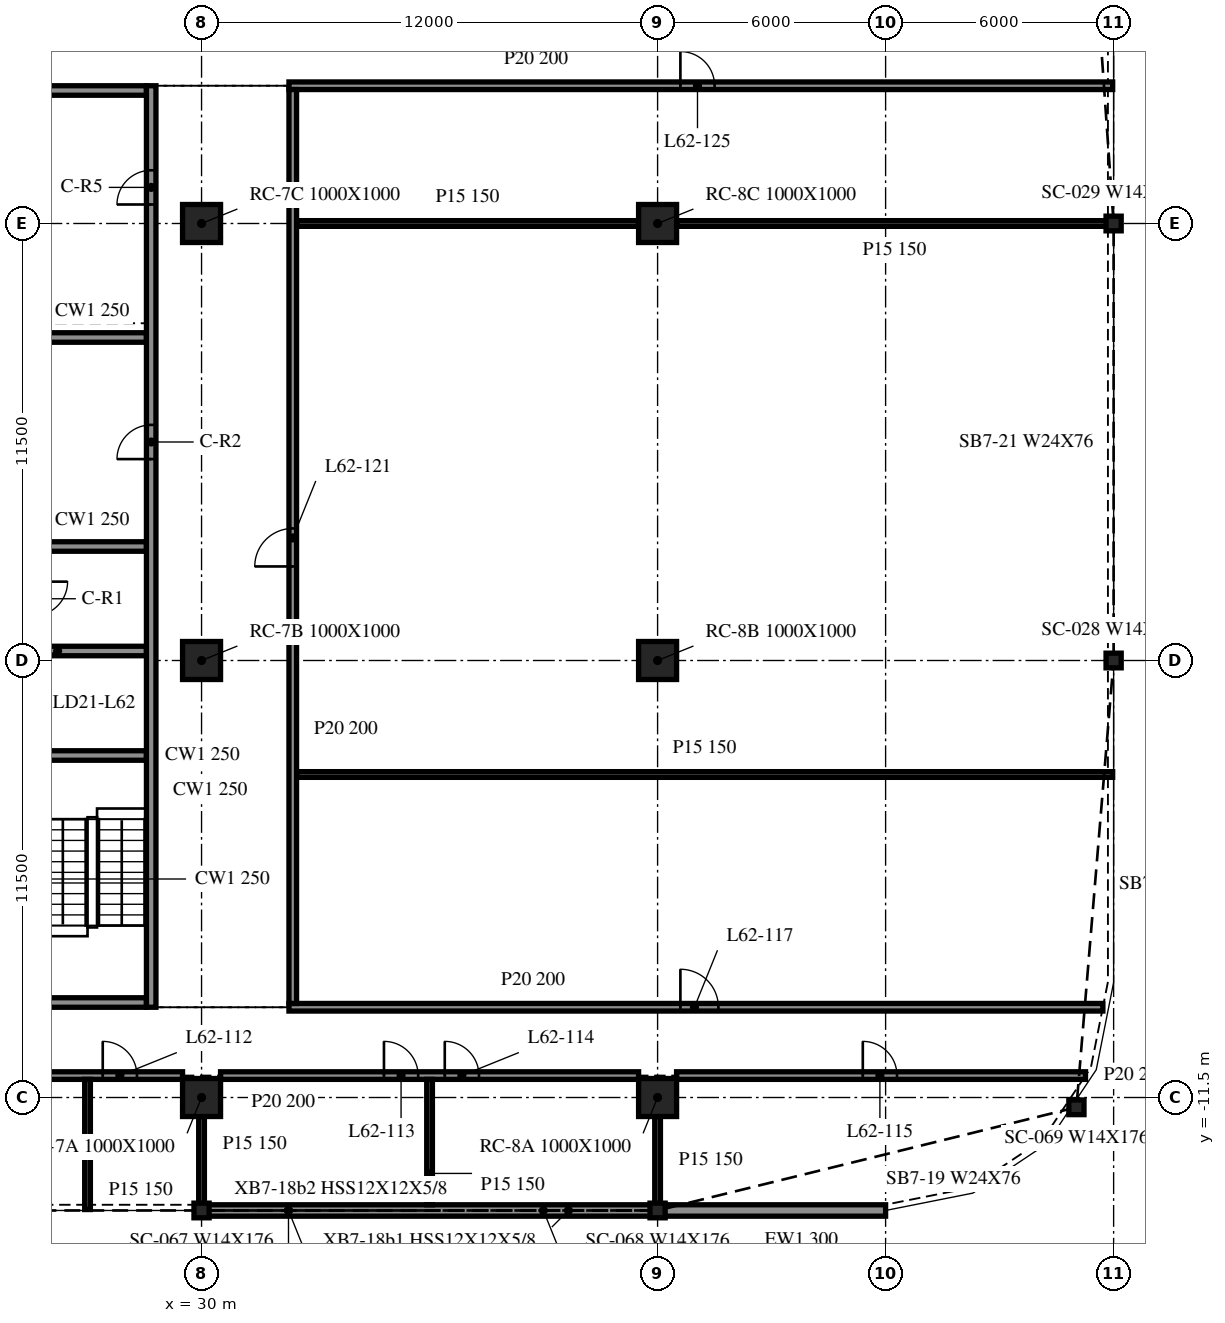
"""IFC4 building model, lengths in metres.
Left out: names, types, materials, properties, quantities, classifications, styles, units other than length and angle.
Written with IfcOpenShell. Run it as: python <this file> out.ifc"""

import sys

from ifc_helpers import new_model, si_unit, direction, frame, frame_2d, origin, origin_2d, place, context, subcontext, project, spatial, rectangle, i_section, extrude, element, fill, save


model = new_model("IFC4")
c1 = context("Model", 3, precision=1e-05, world=origin(), true_north=direction((0.0, 1.0)))
c2 = subcontext(c1, "Body", "Model", "MODEL_VIEW")
j1 = project(units=[si_unit("LENGTHUNIT", "METRE"), si_unit("PLANEANGLEUNIT", "RADIAN")], contexts=[c1])
p1 = place(None, origin())
s1 = spatial("IfcSite", under=j1, at=p1, CompositionType="ELEMENT")
p2 = place(p1, origin())
s2 = spatial("IfcBuilding", under=s1, at=p2, CompositionType="ELEMENT")
p3 = place(p2, frame((0.0, 0.0, 255.2)))
s3 = spatial("IfcBuildingStorey", under=s2, at=p3, CompositionType="ELEMENT", Elevation=255.2)
for number, where, z_axis, x_axis in (
    (1, (30.0, -11.5, -0.34), (0.0, 0.0, 1.0), (1.0, 0.0, 0.0)),
    (2, (30.0, 0.0, -0.34), (0.0, 0.0, 1.0), (1.0, 0.0, 0.0)),
    (3, (30.0, 11.5, -0.34), (0.0, 0.0, 1.0), (1.0, 0.0, 0.0)),
    (4, (42.0, -11.5, -0.34), (0.0, 0.0, 1.0), (1.0, 0.0, 0.0)),
    (5, (42.0, 0.0, -0.34), (0.0, 0.0, 1.0), (1.0, 0.0, 0.0)),
    (6, (42.0, 11.5, -0.34), (0.0, 0.0, 1.0), (1.0, 0.0, 0.0)),
):
    element("IfcColumn", number, at=place(p3, frame(where, z_axis=z_axis, x_axis=x_axis)), inside=s3, PredefinedType="COLUMN", context=c2, shape_type="SweptSolid", body=[
        extrude(rectangle(XDim=1.0, YDim=1.0, at=origin_2d()), origin(), (0.0, 0.0, 1.0), 3.74),
    ])
for number, where, z_axis, x_axis in (
    (7, (30.0, -14.473, -0.34), (0.0, 0.0, 1.0), (1.0, 0.0, 0.0)),
    (8, (42.0, -14.473, -0.34), (0.0, 0.0, 1.0), (1.0, 0.0, 0.0)),
    (9, (53.021, -11.758, -0.34), (0.0, 0.0, 1.0), (1.0, 0.0, 0.0)),
    (10, (54.0, 0.0, -0.34), (0.0, 0.0, 1.0), (1.0, 0.0, 0.0)),
    (11, (54.0, 11.5, -0.34), (0.0, 0.0, 1.0), (1.0, 0.0, 0.0)),
):
    element("IfcColumn", number, at=place(p3, frame(where, z_axis=z_axis, x_axis=x_axis)), inside=s3, PredefinedType="COLUMN", context=c2, shape_type="SweptSolid", body=[
        extrude(i_section(OverallWidth=0.399, OverallDepth=0.386, WebThickness=0.021, FlangeThickness=0.033, at=origin_2d()), origin(), (0.0, 0.0, 1.0), 3.74),
    ])
p4 = place(p3, frame((30.01, -14.473, 0.0), z_axis=(0.0, 0.0, 1.0), x_axis=(1.0, 0.0, 0.0)))
e12 = element("IfcWall", 12, at=p4, inside=s3, PredefinedType="NOTDEFINED", context=c2, shape_type="SweptSolid", body=[
    extrude(rectangle(XDim=11.979, YDim=0.3, at=frame_2d((5.99, 0.0))), origin(), (0.0, 0.0, 1.0), 3.4),
])
p5 = place(p3, frame((42.01, -14.473, 0.0), z_axis=(0.0, 0.0, 1.0), x_axis=(1.0, 0.0, 0.0)))
e13 = element("IfcWall", 13, at=p5, inside=s3, PredefinedType="NOTDEFINED", context=c2, shape_type="SweptSolid", body=[
    extrude(rectangle(XDim=5.99, YDim=0.3, at=frame_2d((2.995, 0.0))), origin(), (0.0, 0.0, 1.0), 3.4),
])
p6 = place(p3, frame((28.675, -9.125, 0.0), z_axis=(0.0, 0.0, 1.0), x_axis=(0.0, 1.0, 0.0)))
e14 = element("IfcWall", 14, at=p6, inside=s3, PredefinedType="SOLIDWALL", context=c2, shape_type="SweptSolid", body=[
    extrude(rectangle(XDim=24.25, YDim=0.25, at=frame_2d((12.125, 0.0))), origin(), (0.0, 0.0, 1.0), 3.4),
])
p7 = place(p6, frame((14.425, 0.0, 0.0)))
e15 = element("IfcOpeningElement", 15, at=p7, cuts=e14, PredefinedType="OPENING", context=c2, shape_type="SweptSolid", body=[
    extrude(rectangle(XDim=0.9, YDim=2.1, at=frame_2d((0.45, 1.05))), frame((0.0, 0.135, 0.0), z_axis=(0.0, -1.0, 0.0), x_axis=(1.0, 0.0, 0.0)), (0.0, 0.0, 1.0), 0.27),
])
p8 = place(p6, frame((21.125, 0.0, 0.0)))
e16 = element("IfcOpeningElement", 16, at=p8, cuts=e14, PredefinedType="OPENING", context=c2, shape_type="SweptSolid", body=[
    extrude(rectangle(XDim=0.9, YDim=2.1, at=frame_2d((0.45, 1.05))), frame((0.0, 0.135, 0.0), z_axis=(0.0, -1.0, 0.0), x_axis=(1.0, 0.0, 0.0)), (0.0, 0.0, 1.0), 0.27),
])
p9 = place(p3, frame((28.55, -9.0, 0.0), z_axis=(0.0, 0.0, 1.0), x_axis=(-1.0, 0.0, 0.0)))
e17 = element("IfcWall", 17, at=p9, inside=s3, PredefinedType="SOLIDWALL", context=c2, shape_type="SweptSolid", body=[
    extrude(rectangle(XDim=9.1, YDim=0.25, at=frame_2d((4.55, 0.0))), origin(), (0.0, 0.0, 1.0), 3.4),
])
p10 = place(p9, frame((3.65, 0.0, 0.0)))
e18 = element("IfcOpeningElement", 18, at=p10, cuts=e17, PredefinedType="OPENING", context=c2, shape_type="SweptSolid", body=[
    extrude(rectangle(XDim=1.8, YDim=2.1, at=frame_2d((0.9, 1.05))), frame((0.0, 0.135, 0.0), z_axis=(0.0, -1.0, 0.0), x_axis=(1.0, 0.0, 0.0)), (0.0, 0.0, 1.0), 0.27),
])
p11 = place(p3, frame((19.45, 15.0, 0.0), z_axis=(0.0, 0.0, 1.0), x_axis=(1.0, 0.0, 0.0)))
e19 = element("IfcWall", 19, at=p11, inside=s3, PredefinedType="SOLIDWALL", context=c2, shape_type="SweptSolid", body=[
    extrude(rectangle(XDim=9.1, YDim=0.25, at=frame_2d((4.55, 0.0))), origin(), (0.0, 0.0, 1.0), 3.4),
])
p12 = place(p11, frame((3.65, 0.0, 0.0)))
e20 = element("IfcOpeningElement", 20, at=p12, cuts=e19, PredefinedType="OPENING", context=c2, shape_type="SweptSolid", body=[
    extrude(rectangle(XDim=1.8, YDim=2.1, at=frame_2d((0.9, 1.05))), frame((0.0, 0.135, 0.0), z_axis=(0.0, -1.0, 0.0), x_axis=(1.0, 0.0, 0.0)), (0.0, 0.0, 1.0), 0.27),
])
for number, where, z_axis, x_axis in (
    (21, (25.7, -2.5, 0.0), (0.0, 0.0, 1.0), (1.0, 0.0, 0.0)),
    (22, (25.7, 0.25, 0.0), (0.0, 0.0, 1.0), (1.0, 0.0, 0.0)),
    (23, (25.7, 3.0, 0.0), (0.0, 0.0, 1.0), (1.0, 0.0, 0.0)),
    (24, (25.7, 8.5, 0.0), (0.0, 0.0, 1.0), (1.0, 0.0, 0.0)),
):
    element("IfcWall", number, at=place(p3, frame(where, z_axis=z_axis, x_axis=x_axis)), inside=s3, PredefinedType="SOLIDWALL", context=c2, shape_type="SweptSolid", body=[
        extrude(rectangle(XDim=2.85, YDim=0.25, at=frame_2d((1.425, 0.0))), origin(), (0.0, 0.0, 1.0), 3.4),
    ])
p13 = place(p3, frame((18.5, -10.923, 0.0), z_axis=(0.0, 0.0, 1.0), x_axis=(1.0, 0.0, 0.0)))
e25 = element("IfcWall", 25, at=p13, inside=s3, PredefinedType="PARTITIONING", context=c2, shape_type="SweptSolid", body=[
    extrude(rectangle(XDim=11.0, YDim=0.2, at=frame_2d((5.5, 0.0))), origin(), (0.0, 0.0, 1.0), 3.4),
])
p14 = place(p13, frame((5.1, 0.0, 0.0)))
e26 = element("IfcOpeningElement", 26, at=p14, cuts=e25, PredefinedType="OPENING", context=c2, shape_type="SweptSolid", body=[
    extrude(rectangle(XDim=0.9, YDim=2.1, at=frame_2d((0.45, 1.05))), frame((0.0, 0.11, 0.0), z_axis=(0.0, -1.0, 0.0), x_axis=(1.0, 0.0, 0.0)), (0.0, 0.0, 1.0), 0.22),
])
p15 = place(p13, frame((8.9, 0.0, 0.0)))
e27 = element("IfcOpeningElement", 27, at=p15, cuts=e25, PredefinedType="OPENING", context=c2, shape_type="SweptSolid", body=[
    extrude(rectangle(XDim=0.9, YDim=2.1, at=frame_2d((0.45, 1.05))), frame((0.0, 0.11, 0.0), z_axis=(0.0, -1.0, 0.0), x_axis=(1.0, 0.0, 0.0)), (0.0, 0.0, 1.0), 0.22),
])
p16 = place(p3, frame((30.5, -10.923, 0.0), z_axis=(0.0, 0.0, 1.0), x_axis=(1.0, 0.0, 0.0)))
e28 = element("IfcWall", 28, at=p16, inside=s3, PredefinedType="PARTITIONING", context=c2, shape_type="SweptSolid", body=[
    extrude(rectangle(XDim=11.0, YDim=0.2, at=frame_2d((5.5, 0.0))), origin(), (0.0, 0.0, 1.0), 3.4),
])
p17 = place(p16, frame((4.3, 0.0, 0.0)))
e29 = element("IfcOpeningElement", 29, at=p17, cuts=e28, PredefinedType="OPENING", context=c2, shape_type="SweptSolid", body=[
    extrude(rectangle(XDim=0.9, YDim=2.1, at=frame_2d((0.45, 1.05))), frame((0.0, 0.11, 0.0), z_axis=(0.0, -1.0, 0.0), x_axis=(1.0, 0.0, 0.0)), (0.0, 0.0, 1.0), 0.22),
])
p18 = place(p16, frame((5.9, 0.0, 0.0)))
e30 = element("IfcOpeningElement", 30, at=p18, cuts=e28, PredefinedType="OPENING", context=c2, shape_type="SweptSolid", body=[
    extrude(rectangle(XDim=0.9, YDim=2.1, at=frame_2d((0.45, 1.05))), frame((0.0, 0.11, 0.0), z_axis=(0.0, -1.0, 0.0), x_axis=(1.0, 0.0, 0.0)), (0.0, 0.0, 1.0), 0.22),
])
p19 = place(p3, frame((42.5, -10.923, 0.0), z_axis=(0.0, 0.0, 1.0), x_axis=(1.0, 0.0, 0.0)))
e31 = element("IfcWall", 31, at=p19, inside=s3, PredefinedType="PARTITIONING", context=c2, shape_type="SweptSolid", body=[
    extrude(rectangle(XDim=10.76, YDim=0.2, at=frame_2d((5.38, 0.0))), origin(), (0.0, 0.0, 1.0), 3.4),
])
p20 = place(p19, frame((4.9, 0.0, 0.0)))
e32 = element("IfcOpeningElement", 32, at=p20, cuts=e31, PredefinedType="OPENING", context=c2, shape_type="SweptSolid", body=[
    extrude(rectangle(XDim=0.9, YDim=2.1, at=frame_2d((0.45, 1.05))), frame((0.0, 0.11, 0.0), z_axis=(0.0, -1.0, 0.0), x_axis=(1.0, 0.0, 0.0)), (0.0, 0.0, 1.0), 0.22),
])
p21 = place(p3, frame((32.3, -9.125, 0.0), z_axis=(0.0, 0.0, 1.0), x_axis=(1.0, 0.0, 0.0)))
e33 = element("IfcWall", 33, at=p21, inside=s3, PredefinedType="PARTITIONING", context=c2, shape_type="SweptSolid", body=[
    extrude(rectangle(XDim=21.417, YDim=0.2, at=frame_2d((10.708, 0.0))), origin(), (0.0, 0.0, 1.0), 3.4),
])
p22 = place(p21, frame((10.3, 0.0, 0.0)))
e34 = element("IfcOpeningElement", 34, at=p22, cuts=e33, PredefinedType="OPENING", context=c2, shape_type="SweptSolid", body=[
    extrude(rectangle(XDim=1.0, YDim=2.1, at=frame_2d((0.5, 1.05))), frame((0.0, 0.11, 0.0), z_axis=(0.0, -1.0, 0.0), x_axis=(1.0, 0.0, 0.0)), (0.0, 0.0, 1.0), 0.22),
])
p23 = place(p3, frame((32.5, -3.0, 0.0), z_axis=(0.0, 0.0, 1.0), x_axis=(1.0, 0.0, 0.0)))
e35 = element("IfcWall", 35, at=p23, inside=s3, PredefinedType="PARTITIONING", context=c2, shape_type="SweptSolid", body=[
    extrude(rectangle(XDim=21.475, YDim=0.15, at=frame_2d((10.738, 0.0))), origin(), (0.0, 0.0, 1.0), 3.4),
])
p24 = place(p3, frame((32.5, 11.5, 0.0), z_axis=(0.0, 0.0, 1.0), x_axis=(1.0, 0.0, 0.0)))
e36 = element("IfcWall", 36, at=p24, inside=s3, PredefinedType="PARTITIONING", context=c2, shape_type="SweptSolid", body=[
    extrude(rectangle(XDim=9.0, YDim=0.15, at=frame_2d((4.5, 0.0))), origin(), (0.0, 0.0, 1.0), 2.401),
])
p25 = place(p3, frame((42.5, 11.5, 0.0), z_axis=(0.0, 0.0, 1.0), x_axis=(1.0, 0.0, 0.0)))
e37 = element("IfcWall", 37, at=p25, inside=s3, PredefinedType="PARTITIONING", context=c2, shape_type="SweptSolid", body=[
    extrude(rectangle(XDim=11.475, YDim=0.15, at=frame_2d((5.738, 0.0))), origin(), (0.0, 0.0, 1.0), 2.401),
])
p26 = place(p3, frame((32.3, 15.125, 0.0), z_axis=(0.0, 0.0, 1.0), x_axis=(1.0, 0.0, 0.0)))
e38 = element("IfcWall", 38, at=p26, inside=s3, PredefinedType="PARTITIONING", context=c2, shape_type="SweptSolid", body=[
    extrude(rectangle(XDim=21.675, YDim=0.2, at=frame_2d((10.837, 0.0))), origin(), (0.0, 0.0, 1.0), 3.4),
])
p27 = place(p26, frame((10.3, 0.0, 0.0)))
e39 = element("IfcOpeningElement", 39, at=p27, cuts=e38, PredefinedType="OPENING", context=c2, shape_type="SweptSolid", body=[
    extrude(rectangle(XDim=0.9, YDim=2.1, at=frame_2d((0.45, 1.05))), frame((0.0, 0.11, 0.0), z_axis=(0.0, -1.0, 0.0), x_axis=(1.0, 0.0, 0.0)), (0.0, 0.0, 1.0), 0.22),
])
p28 = place(p3, frame((27.0, -14.448, 0.0), z_axis=(0.0, 0.0, 1.0), x_axis=(0.0, 1.0, 0.0)))
e40 = element("IfcWall", 40, at=p28, inside=s3, PredefinedType="PARTITIONING", context=c2, shape_type="SweptSolid", body=[
    extrude(rectangle(XDim=3.425, YDim=0.15, at=frame_2d((1.712, 0.0))), origin(), (0.0, 0.0, 1.0), 3.4),
])
p29 = place(p3, frame((30.0, -14.448, 0.0), z_axis=(0.0, 0.0, 1.0), x_axis=(0.0, 1.0, 0.0)))
e41 = element("IfcWall", 41, at=p29, inside=s3, PredefinedType="PARTITIONING", context=c2, shape_type="SweptSolid", body=[
    extrude(rectangle(XDim=2.448, YDim=0.15, at=frame_2d((1.224, 0.0))), origin(), (0.0, 0.0, 1.0), 2.401),
])
p30 = place(p3, frame((32.4, -9.025, 0.0), z_axis=(0.0, 0.0, 1.0), x_axis=(0.0, 1.0, 0.0)))
e42 = element("IfcWall", 42, at=p30, inside=s3, PredefinedType="PARTITIONING", context=c2, shape_type="SweptSolid", body=[
    extrude(rectangle(XDim=24.05, YDim=0.2, at=frame_2d((12.025, 0.0))), origin(), (0.0, 0.0, 1.0), 3.4),
])
p31 = place(p30, frame((11.5, 0.0, 0.0)))
e43 = element("IfcOpeningElement", 43, at=p31, cuts=e42, PredefinedType="OPENING", context=c2, shape_type="SweptSolid", body=[
    extrude(rectangle(XDim=1.0, YDim=2.1, at=frame_2d((0.5, 1.05))), frame((0.0, 0.11, 0.0), z_axis=(0.0, -1.0, 0.0), x_axis=(1.0, 0.0, 0.0)), (0.0, 0.0, 1.0), 0.22),
])
p32 = place(p3, frame((36.0, -14.323, 0.0), z_axis=(0.0, 0.0, 1.0), x_axis=(0.0, 1.0, 0.0)))
e44 = element("IfcWall", 44, at=p32, inside=s3, PredefinedType="PARTITIONING", context=c2, shape_type="SweptSolid", body=[
    extrude(rectangle(XDim=3.3, YDim=0.15, at=frame_2d((1.65, 0.0))), origin(), (0.0, 0.0, 1.0), 3.4),
])
p33 = place(p3, frame((42.0, -14.323, 0.0), z_axis=(0.0, 0.0, 1.0), x_axis=(0.0, 1.0, 0.0)))
e45 = element("IfcWall", 45, at=p33, inside=s3, PredefinedType="PARTITIONING", context=c2, shape_type="SweptSolid", body=[
    extrude(rectangle(XDim=2.323, YDim=0.15, at=frame_2d((1.162, 0.0))), origin(), (0.0, 0.0, 1.0), 2.401),
])
p34 = place(p7, origin())
e46 = element("IfcDoor", 46, at=p34, inside=s3, OperationType="SINGLE_SWING_RIGHT", PredefinedType="DOOR", context=c2, shape_type="SweptSolid", body=[
    extrude(rectangle(XDim=0.9, YDim=2.1, at=frame_2d((0.45, 1.05))), frame((0.0, 0.025, 0.0), z_axis=(0.0, -1.0, 0.0), x_axis=(1.0, 0.0, 0.0)), (0.0, 0.0, 1.0), 0.05),
])
fill(e15, e46)
p35 = place(p8, origin())
e47 = element("IfcDoor", 47, at=p35, inside=s3, OperationType="SINGLE_SWING_LEFT", PredefinedType="DOOR", context=c2, shape_type="SweptSolid", body=[
    extrude(rectangle(XDim=0.9, YDim=2.1, at=frame_2d((0.45, 1.05))), frame((0.0, 0.025, 0.0), z_axis=(0.0, -1.0, 0.0), x_axis=(1.0, 0.0, 0.0)), (0.0, 0.0, 1.0), 0.05),
])
fill(e16, e47)
p36 = place(p15, origin())
e48 = element("IfcDoor", 48, at=p36, inside=s3, OperationType="SINGLE_SWING_LEFT", PredefinedType="DOOR", context=c2, shape_type="SweptSolid", body=[
    extrude(rectangle(XDim=0.9, YDim=2.1, at=frame_2d((0.45, 1.05))), frame((0.0, 0.025, 0.0), z_axis=(0.0, -1.0, 0.0), x_axis=(1.0, 0.0, 0.0)), (0.0, 0.0, 1.0), 0.05),
])
fill(e27, e48)
p37 = place(p17, origin())
e49 = element("IfcDoor", 49, at=p37, inside=s3, OperationType="SINGLE_SWING_RIGHT", PredefinedType="DOOR", context=c2, shape_type="SweptSolid", body=[
    extrude(rectangle(XDim=0.9, YDim=2.1, at=frame_2d((0.45, 1.05))), frame((0.0, 0.025, 0.0), z_axis=(0.0, -1.0, 0.0), x_axis=(1.0, 0.0, 0.0)), (0.0, 0.0, 1.0), 0.05),
])
fill(e29, e49)
p38 = place(p18, origin())
e50 = element("IfcDoor", 50, at=p38, inside=s3, OperationType="SINGLE_SWING_LEFT", PredefinedType="DOOR", context=c2, shape_type="SweptSolid", body=[
    extrude(rectangle(XDim=0.9, YDim=2.1, at=frame_2d((0.45, 1.05))), frame((0.0, 0.025, 0.0), z_axis=(0.0, -1.0, 0.0), x_axis=(1.0, 0.0, 0.0)), (0.0, 0.0, 1.0), 0.05),
])
fill(e30, e50)
p39 = place(p20, origin())
e51 = element("IfcDoor", 51, at=p39, inside=s3, OperationType="SINGLE_SWING_RIGHT", PredefinedType="DOOR", context=c2, shape_type="SweptSolid", body=[
    extrude(rectangle(XDim=0.9, YDim=2.1, at=frame_2d((0.45, 1.05))), frame((0.0, 0.025, 0.0), z_axis=(0.0, -1.0, 0.0), x_axis=(1.0, 0.0, 0.0)), (0.0, 0.0, 1.0), 0.05),
])
fill(e32, e51)
p40 = place(p22, origin())
e52 = element("IfcDoor", 52, at=p40, inside=s3, OperationType="SINGLE_SWING_RIGHT", PredefinedType="DOOR", context=c2, shape_type="SweptSolid", body=[
    extrude(rectangle(XDim=1.0, YDim=2.1, at=frame_2d((0.5, 1.05))), frame((0.0, 0.025, 0.0), z_axis=(0.0, -1.0, 0.0), x_axis=(1.0, 0.0, 0.0)), (0.0, 0.0, 1.0), 0.05),
])
fill(e34, e52)
p41 = place(p31, origin())
e53 = element("IfcDoor", 53, at=p41, inside=s3, OperationType="SINGLE_SWING_RIGHT", PredefinedType="DOOR", context=c2, shape_type="SweptSolid", body=[
    extrude(rectangle(XDim=1.0, YDim=2.1, at=frame_2d((0.5, 1.05))), frame((0.0, 0.025, 0.0), z_axis=(0.0, -1.0, 0.0), x_axis=(1.0, 0.0, 0.0)), (0.0, 0.0, 1.0), 0.05),
])
fill(e43, e53)
p42 = place(p27, origin())
e54 = element("IfcDoor", 54, at=p42, inside=s3, OperationType="SINGLE_SWING_RIGHT", PredefinedType="DOOR", context=c2, shape_type="SweptSolid", body=[
    extrude(rectangle(XDim=0.9, YDim=2.1, at=frame_2d((0.45, 1.05))), frame((0.0, 0.025, 0.0), z_axis=(0.0, -1.0, 0.0), x_axis=(1.0, 0.0, 0.0)), (0.0, 0.0, 1.0), 0.05),
])
fill(e39, e54)
save(model, sys.argv[1])
